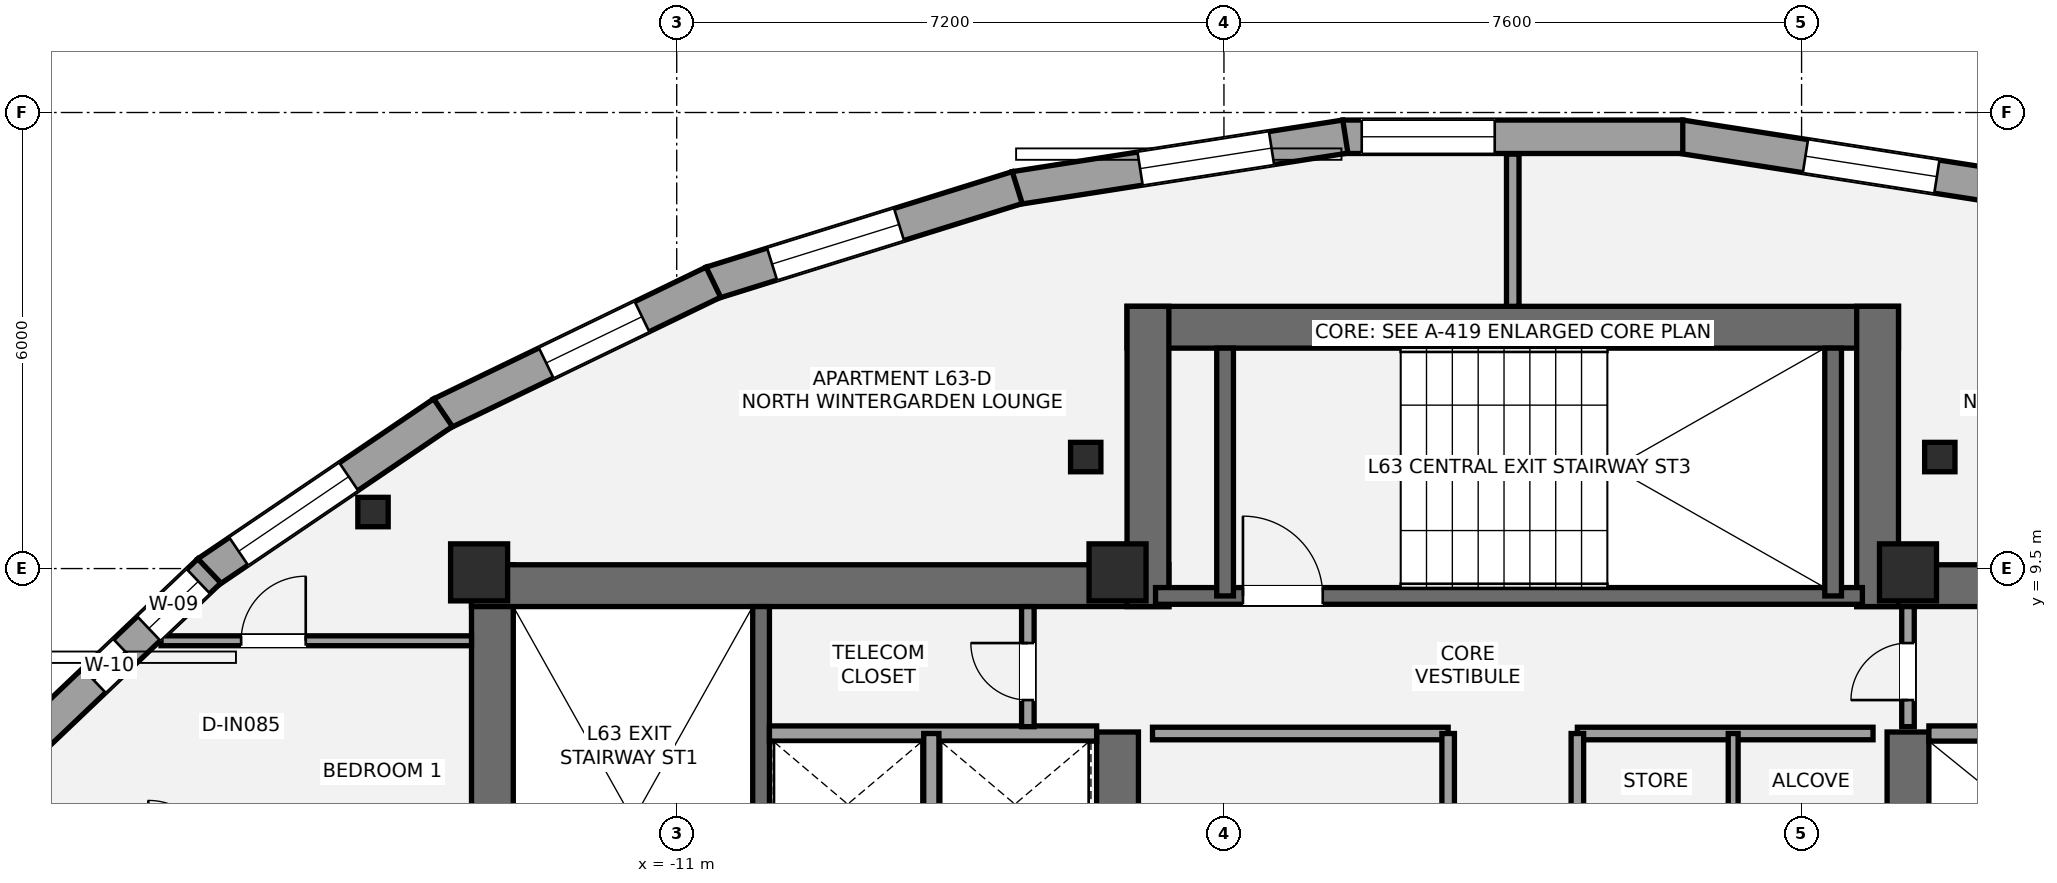
"""IFC4 building model, lengths in metres.
Left out: names, types, materials, properties, quantities, classifications, styles, units other than length and angle.
Written with IfcOpenShell. Run it as: python <this file> out.ifc"""

import sys

from ifc_helpers import new_model, si_unit, direction, frame, frame_2d, origin, origin_2d, place, context, subcontext, project, spatial, rectangle, i_section, extrude, element, fill, save


model = new_model("IFC4")
c1 = context("Model", 3, precision=1e-05, world=origin(), true_north=direction((0.0, 1.0)))
c2 = subcontext(c1, "Body", "Model", "MODEL_VIEW")
j1 = project(units=[si_unit("LENGTHUNIT", "METRE"), si_unit("PLANEANGLEUNIT", "RADIAN")], contexts=[c1])
p1 = place(None, origin())
s1 = spatial("IfcSite", under=j1, at=p1, CompositionType="ELEMENT")
p2 = place(p1, origin())
s2 = spatial("IfcBuilding", under=s1, at=p2, CompositionType="ELEMENT")
p3 = place(p2, frame((0.0, 0.0, 225.75)))
s3 = spatial("IfcBuildingStorey", under=s2, at=p3, CompositionType="ELEMENT", Elevation=225.75)
p4 = place(p3, frame((-13.425, 1.3, 0.0), z_axis=(0.0, 0.0, 1.0), x_axis=(0.0, 1.0, 0.0)))
e1 = element("IfcWall", 1, at=p4, inside=s3, PredefinedType="SHEAR", context=c2, shape_type="SweptSolid", body=[
    extrude(rectangle(XDim=8.25, YDim=0.55, at=frame_2d((4.125, 0.0))), origin(), (0.0, 0.0, 1.0), 3.15),
])
p5 = place(p3, frame((-13.7, 9.275, 0.0), z_axis=(0.0, 0.0, 1.0), x_axis=(1.0, 0.0, 0.0)))
e2 = element("IfcWall", 2, at=p5, inside=s3, PredefinedType="SHEAR", context=c2, shape_type="SweptSolid", body=[
    extrude(rectangle(XDim=9.175, YDim=0.55, at=frame_2d((4.587, 0.0))), origin(), (0.0, 0.0, 1.0), 3.15),
])
p6 = place(p3, frame((-5.2, 5.35, 0.0), z_axis=(0.0, 0.0, 1.0), x_axis=(0.0, 1.0, 0.0)))
e3 = element("IfcWall", 3, at=p6, inside=s3, PredefinedType="SHEAR", context=c2, shape_type="SweptSolid", body=[
    extrude(rectangle(XDim=2.0, YDim=0.55, at=frame_2d((1.0, 0.0))), origin(), (0.0, 0.0, 1.0), 3.15),
])
p7 = place(p3, frame((-9.89, 1.85, 0.0), z_axis=(0.0, 0.0, 1.0), x_axis=(0.0, 1.0, 0.0)))
e4 = element("IfcWall", 4, at=p7, inside=s3, PredefinedType="SHEAR", context=c2, shape_type="SweptSolid", body=[
    extrude(rectangle(XDim=7.15, YDim=0.22, at=frame_2d((3.575, 0.0))), origin(), (0.0, 0.0, 1.0), 3.15),
])
p8 = place(p3, frame((4.525, 9.275, 0.0), z_axis=(0.0, 0.0, 1.0), x_axis=(1.0, 0.0, 0.0)))
e5 = element("IfcWall", 5, at=p8, inside=s3, PredefinedType="SHEAR", context=c2, shape_type="SweptSolid", body=[
    extrude(rectangle(XDim=9.175, YDim=0.55, at=frame_2d((4.587, 0.0))), origin(), (0.0, 0.0, 1.0), 3.15),
])
p9 = place(p3, frame((5.2, 5.35, 0.0), z_axis=(0.0, 0.0, 1.0), x_axis=(0.0, 1.0, 0.0)))
e6 = element("IfcWall", 6, at=p9, inside=s3, PredefinedType="SHEAR", context=c2, shape_type="SweptSolid", body=[
    extrude(rectangle(XDim=2.0, YDim=0.55, at=frame_2d((1.0, 0.0))), origin(), (0.0, 0.0, 1.0), 3.15),
])
p10 = place(p3, frame((-5.075, 12.675, 0.0), z_axis=(0.0, 0.0, 1.0), x_axis=(1.0, 0.0, 0.0)))
e7 = element("IfcWall", 7, at=p10, inside=s3, PredefinedType="SHEAR", context=c2, shape_type="SweptSolid", body=[
    extrude(rectangle(XDim=10.15, YDim=0.55, at=frame_2d((5.075, 0.0))), origin(), (0.0, 0.0, 1.0), 3.15),
])
for number, where, z_axis, x_axis in (
    (8, (-4.8, 9.0, 0.0), (0.0, 0.0, 1.0), (0.0, 1.0, 0.0)),
    (9, (4.8, 9.0, 0.0), (0.0, 0.0, 1.0), (0.0, 1.0, 0.0)),
):
    element("IfcWall", number, at=place(p3, frame(where, z_axis=z_axis, x_axis=x_axis)), inside=s3, PredefinedType="SHEAR", context=c2, shape_type="SweptSolid", body=[
        extrude(rectangle(XDim=3.95, YDim=0.55, at=frame_2d((1.975, 0.0))), origin(), (0.0, 0.0, 1.0), 3.15),
    ])
p11 = place(p3, frame((-4.7, 9.14, 0.0), z_axis=(0.0, 0.0, 1.0), x_axis=(1.0, 0.0, 0.0)))
e10 = element("IfcWall", 10, at=p11, inside=s3, PredefinedType="SHEAR", context=c2, shape_type="SweptSolid", body=[
    extrude(rectangle(XDim=9.3, YDim=0.22, at=frame_2d((4.65, 0.0))), origin(), (0.0, 0.0, 1.0), 3.15),
])
p12 = place(p11, frame((1.15, 0.0, 0.0)))
e11 = element("IfcOpeningElement", 11, at=p12, cuts=e10, PredefinedType="OPENING", context=c2, shape_type="SweptSolid", body=[
    extrude(rectangle(XDim=1.05, YDim=2.15, at=frame_2d((0.525, 1.075))), frame((0.0, 0.12, 0.0), z_axis=(0.0, -1.0, 0.0), x_axis=(1.0, 0.0, 0.0)), (0.0, 0.0, 1.0), 0.24),
])
for number, where, z_axis, x_axis in (
    (12, (-3.785, 9.14, 0.0), (0.0, 0.0, 1.0), (0.0, 1.0, 0.0)),
    (13, (4.215, 9.14, 0.0), (0.0, 0.0, 1.0), (0.0, 1.0, 0.0)),
):
    element("IfcWall", number, at=place(p3, frame(where, z_axis=z_axis, x_axis=x_axis)), inside=s3, PredefinedType="SHEAR", context=c2, shape_type="SweptSolid", body=[
        extrude(rectangle(XDim=3.26, YDim=0.22, at=frame_2d((1.63, 0.0))), origin(), (0.0, 0.0, 1.0), 3.15),
    ])
for number, where, z_axis, x_axis in (
    (14, (-13.6, 9.45, 0.0), (0.0, 0.0, 1.0), (1.0, 0.0, 0.0)),
    (15, (-5.2, 9.45, 0.0), (0.0, 0.0, 1.0), (1.0, 0.0, 0.0)),
    (16, (5.2, 9.45, 0.0), (0.0, 0.0, 1.0), (1.0, 0.0, 0.0)),
):
    element("IfcColumn", number, at=place(p3, frame(where, z_axis=z_axis, x_axis=x_axis)), inside=s3, PredefinedType="PILASTER", context=c2, shape_type="SweptSolid", body=[
        extrude(rectangle(XDim=0.75, YDim=0.75, at=origin_2d()), origin(), (0.0, 0.0, 1.0), 3.15),
    ])
for number, where, z_axis, x_axis in (
    (17, (5.619, 10.967, 0.0), (0.0, 0.0, 1.0), (1.0, 0.0, 0.0)),
    (18, (-5.619, 10.967, 0.0), (0.0, 0.0, 1.0), (1.0, 0.0, 0.0)),
    (19, (-14.996, 10.244, 0.0), (0.0, 0.0, 1.0), (1.0, 0.0, 0.0)),
):
    element("IfcColumn", number, at=place(p3, frame(where, z_axis=z_axis, x_axis=x_axis)), inside=s3, PredefinedType="COLUMN", context=c2, shape_type="SweptSolid", body=[
        extrude(i_section(OverallWidth=0.399, OverallDepth=0.387, WebThickness=0.021, FlangeThickness=0.033, at=origin_2d()), origin(), (0.0, 0.0, 1.0), 3.15),
    ])
p13 = place(p3, frame((2.203, 15.183, 0.0), z_axis=(0.0, 0.0, 1.0), x_axis=(0.988037139715, -0.154216116355, 0.0)))
e20 = element("IfcWall", 20, at=p13, inside=s3, PredefinedType="STANDARD", context=c2, shape_type="SweptSolid", body=[
    extrude(rectangle(XDim=4.401, YDim=0.44, at=frame_2d((2.201, 0.0))), origin(), (0.0, 0.0, 1.0), 2.336),
])
p14 = place(p13, frame((1.668, 0.0, 0.55)))
e21 = element("IfcOpeningElement", 21, at=p14, cuts=e20, PredefinedType="OPENING", context=c2, shape_type="SweptSolid", body=[
    extrude(rectangle(XDim=1.75, YDim=1.55, at=frame_2d((0.875, 0.775))), frame((0.0, 0.23, 0.0), z_axis=(0.0, -1.0, 0.0), x_axis=(1.0, 0.0, 0.0)), (0.0, 0.0, 1.0), 0.46),
])
p15 = place(p3, frame((-2.237, 15.181, 0.0), z_axis=(0.0, 0.0, 1.0), x_axis=(1.0, 0.0, 0.0)))
e22 = element("IfcWall", 22, at=p15, inside=s3, PredefinedType="STANDARD", context=c2, shape_type="SweptSolid", body=[
    extrude(rectangle(XDim=4.474, YDim=0.44, at=frame_2d((2.237, 0.0))), origin(), (0.0, 0.0, 1.0), 2.336),
])
p16 = place(p15, frame((0.25, 0.0, 0.55)))
e23 = element("IfcOpeningElement", 23, at=p16, cuts=e22, PredefinedType="OPENING", context=c2, shape_type="SweptSolid", body=[
    extrude(rectangle(XDim=1.75, YDim=1.55, at=frame_2d((0.875, 0.775))), frame((0.0, 0.23, 0.0), z_axis=(0.0, -1.0, 0.0), x_axis=(1.0, 0.0, 0.0)), (0.0, 0.0, 1.0), 0.46),
])
p17 = place(p3, frame((-6.551, 14.505, 0.0), z_axis=(0.0, 0.0, 1.0), x_axis=(0.988037139715, 0.154216116355, 0.0)))
e24 = element("IfcWall", 24, at=p17, inside=s3, PredefinedType="STANDARD", context=c2, shape_type="SweptSolid", body=[
    extrude(rectangle(XDim=4.401, YDim=0.44, at=frame_2d((2.201, 0.0))), origin(), (0.0, 0.0, 1.0), 2.336),
])
p18 = place(p17, frame((1.668, 0.0, 0.55)))
e25 = element("IfcOpeningElement", 25, at=p18, cuts=e24, PredefinedType="OPENING", context=c2, shape_type="SweptSolid", body=[
    extrude(rectangle(XDim=1.75, YDim=1.55, at=frame_2d((0.875, 0.775))), frame((0.0, 0.23, 0.0), z_axis=(0.0, -1.0, 0.0), x_axis=(1.0, 0.0, 0.0)), (0.0, 0.0, 1.0), 0.46),
])
p19 = place(p3, frame((-10.548, 13.256, 0.0), z_axis=(0.0, 0.0, 1.0), x_axis=(0.954643532685, 0.297751113352, 0.0)))
e26 = element("IfcWall", 26, at=p19, inside=s3, PredefinedType="STANDARD", context=c2, shape_type="SweptSolid", body=[
    extrude(rectangle(XDim=4.219, YDim=0.44, at=frame_2d((2.11, 0.0))), origin(), (0.0, 0.0, 1.0), 2.336),
])
p20 = place(p19, frame((0.841, 0.0, 0.55)))
e27 = element("IfcOpeningElement", 27, at=p20, cuts=e26, PredefinedType="OPENING", context=c2, shape_type="SweptSolid", body=[
    extrude(rectangle(XDim=1.75, YDim=1.55, at=frame_2d((0.875, 0.775))), frame((0.0, 0.23, 0.0), z_axis=(0.0, -1.0, 0.0), x_axis=(1.0, 0.0, 0.0)), (0.0, 0.0, 1.0), 0.46),
])
p21 = place(p3, frame((-14.103, 11.535, 0.0), z_axis=(0.0, 0.0, 1.0), x_axis=(0.900331335269, 0.435205108808, 0.0)))
e28 = element("IfcWall", 28, at=p21, inside=s3, PredefinedType="STANDARD", context=c2, shape_type="SweptSolid", body=[
    extrude(rectangle(XDim=3.982, YDim=0.44, at=frame_2d((1.991, 0.0))), origin(), (0.0, 0.0, 1.0), 2.336),
])
p22 = place(p21, frame((1.539, 0.0, 0.55)))
e29 = element("IfcOpeningElement", 29, at=p22, cuts=e28, PredefinedType="OPENING", context=c2, shape_type="SweptSolid", body=[
    extrude(rectangle(XDim=1.4, YDim=1.55, at=frame_2d((0.7, 0.775))), frame((0.0, 0.23, 0.0), z_axis=(0.0, -1.0, 0.0), x_axis=(1.0, 0.0, 0.0)), (0.0, 0.0, 1.0), 0.46),
])
p23 = place(p3, frame((-17.177, 9.447, 0.0), z_axis=(0.0, 0.0, 1.0), x_axis=(0.827635686249, 0.561265686504, 0.0)))
e30 = element("IfcWall", 30, at=p23, inside=s3, PredefinedType="STANDARD", context=c2, shape_type="SweptSolid", body=[
    extrude(rectangle(XDim=3.749, YDim=0.44, at=frame_2d((1.875, 0.0))), origin(), (0.0, 0.0, 1.0), 2.336),
])
p24 = place(p23, frame((0.5, 0.0, 0.55)))
e31 = element("IfcOpeningElement", 31, at=p24, cuts=e30, PredefinedType="OPENING", context=c2, shape_type="SweptSolid", body=[
    extrude(rectangle(XDim=1.75, YDim=1.55, at=frame_2d((0.875, 0.775))), frame((0.0, 0.23, 0.0), z_axis=(0.0, -1.0, 0.0), x_axis=(1.0, 0.0, 0.0)), (0.0, 0.0, 1.0), 0.46),
])
p25 = place(p3, frame((-19.705, 7.038, 0.0), z_axis=(0.0, 0.0, 1.0), x_axis=(0.724503260132, 0.689271373306, 0.0)))
e32 = element("IfcWall", 32, at=p25, inside=s3, PredefinedType="STANDARD", context=c2, shape_type="SweptSolid", body=[
    extrude(rectangle(XDim=3.527, YDim=0.44, at=frame_2d((1.764, 0.0))), origin(), (0.0, 0.0, 1.0), 2.336),
])
p26 = place(p25, frame((2.427, 0.0, 0.58)))
e33 = element("IfcOpeningElement", 33, at=p26, cuts=e32, PredefinedType="OPENING", context=c2, shape_type="SweptSolid", body=[
    extrude(rectangle(XDim=0.9, YDim=1.35, at=frame_2d((0.45, 0.675))), frame((0.0, 0.23, 0.0), z_axis=(0.0, -1.0, 0.0), x_axis=(1.0, 0.0, 0.0)), (0.0, 0.0, 1.0), 0.46),
])
p27 = place(p25, frame((1.434, 0.0, 0.58)))
e34 = element("IfcOpeningElement", 34, at=p27, cuts=e32, PredefinedType="OPENING", context=c2, shape_type="SweptSolid", body=[
    extrude(rectangle(XDim=0.56, YDim=1.15, at=frame_2d((0.28, 0.575))), frame((0.0, 0.23, 0.0), z_axis=(0.0, -1.0, 0.0), x_axis=(1.0, 0.0, 0.0)), (0.0, 0.0, 1.0), 0.46),
])
p28 = place(p3, frame((-9.78, 7.33, 0.0), z_axis=(0.0, 0.0, 1.0), x_axis=(1.0, 0.0, 0.0)))
e35 = element("IfcWall", 35, at=p28, inside=s3, PredefinedType="SOLIDWALL", context=c2, shape_type="SweptSolid", body=[
    extrude(rectangle(XDim=4.305, YDim=0.2, at=frame_2d((2.152, 0.0))), origin(), (0.0, 0.0, 1.0), 2.97),
])
p29 = place(p3, frame((-7.65, 5.47, 0.0), z_axis=(0.0, 0.0, 1.0), x_axis=(0.0, 1.0, 0.0)))
e36 = element("IfcWall", 36, at=p29, inside=s3, PredefinedType="SOLIDWALL", context=c2, shape_type="SweptSolid", body=[
    extrude(rectangle(XDim=1.86, YDim=0.2, at=frame_2d((0.93, 0.0))), origin(), (0.0, 0.0, 1.0), 2.97),
])
p30 = place(p3, frame((5.475, 7.33, 0.0), z_axis=(0.0, 0.0, 1.0), x_axis=(1.0, 0.0, 0.0)))
e37 = element("IfcWall", 37, at=p30, inside=s3, PredefinedType="SOLIDWALL", context=c2, shape_type="SweptSolid", body=[
    extrude(rectangle(XDim=4.305, YDim=0.2, at=frame_2d((2.152, 0.0))), origin(), (0.0, 0.0, 1.0), 2.97),
])
p31 = place(p3, frame((-4.74, 7.33, 0.0), z_axis=(0.0, 0.0, 1.0), x_axis=(1.0, 0.0, 0.0)))
e38 = element("IfcWall", 38, at=p31, inside=s3, PredefinedType="PARTITIONING", context=c2, shape_type="SweptSolid", body=[
    extrude(rectangle(XDim=3.89, YDim=0.165, at=frame_2d((1.945, 0.0))), origin(), (0.0, 0.0, 1.0), 2.97),
])
p32 = place(p3, frame((-0.85, 5.52, 0.0), z_axis=(0.0, 0.0, 1.0), x_axis=(0.0, 1.0, 0.0)))
e39 = element("IfcWall", 39, at=p32, inside=s3, PredefinedType="PARTITIONING", context=c2, shape_type="SweptSolid", body=[
    extrude(rectangle(XDim=1.81, YDim=0.165, at=frame_2d((0.905, 0.0))), origin(), (0.0, 0.0, 1.0), 2.97),
])
p33 = place(p3, frame((0.85, 7.33, 0.0), z_axis=(0.0, 0.0, 1.0), x_axis=(1.0, 0.0, 0.0)))
e40 = element("IfcWall", 40, at=p33, inside=s3, PredefinedType="PARTITIONING", context=c2, shape_type="SweptSolid", body=[
    extrude(rectangle(XDim=3.89, YDim=0.165, at=frame_2d((1.945, 0.0))), origin(), (0.0, 0.0, 1.0), 2.97),
])
p34 = place(p3, frame((0.85, 5.52, 0.0), z_axis=(0.0, 0.0, 1.0), x_axis=(0.0, 1.0, 0.0)))
e41 = element("IfcWall", 41, at=p34, inside=s3, PredefinedType="PARTITIONING", context=c2, shape_type="SweptSolid", body=[
    extrude(rectangle(XDim=1.81, YDim=0.165, at=frame_2d((0.905, 0.0))), origin(), (0.0, 0.0, 1.0), 2.97),
])
p35 = place(p3, frame((2.9, 5.52, 0.0), z_axis=(0.0, 0.0, 1.0), x_axis=(0.0, 1.0, 0.0)))
e42 = element("IfcWall", 42, at=p35, inside=s3, PredefinedType="PARTITIONING", context=c2, shape_type="SweptSolid", body=[
    extrude(rectangle(XDim=1.81, YDim=0.13, at=frame_2d((0.905, 0.0))), origin(), (0.0, 0.0, 1.0), 2.97),
])
p36 = place(p3, frame((-6.38, 7.42, 0.0), z_axis=(0.0, 0.0, 1.0), x_axis=(0.0, 1.0, 0.0)))
e43 = element("IfcWall", 43, at=p36, inside=s3, PredefinedType="PARTITIONING", context=c2, shape_type="SweptSolid", body=[
    extrude(rectangle(XDim=1.58, YDim=0.165, at=frame_2d((0.79, 0.0))), origin(), (0.0, 0.0, 1.0), 2.97),
])
p37 = place(p36, frame((0.35, 0.0, 0.0)))
e44 = element("IfcOpeningElement", 44, at=p37, cuts=e43, PredefinedType="OPENING", context=c2, shape_type="SweptSolid", body=[
    extrude(rectangle(XDim=0.75, YDim=2.1, at=frame_2d((0.375, 1.05))), frame((0.0, 0.093, 0.0), z_axis=(0.0, -1.0, 0.0), x_axis=(1.0, 0.0, 0.0)), (0.0, 0.0, 1.0), 0.185),
])
p38 = place(p3, frame((5.2, 7.42, 0.0), z_axis=(0.0, 0.0, 1.0), x_axis=(0.0, 1.0, 0.0)))
e45 = element("IfcWall", 45, at=p38, inside=s3, PredefinedType="PARTITIONING", context=c2, shape_type="SweptSolid", body=[
    extrude(rectangle(XDim=1.58, YDim=0.165, at=frame_2d((0.79, 0.0))), origin(), (0.0, 0.0, 1.0), 2.97),
])
p39 = place(p38, frame((0.35, 0.0, 0.0)))
e46 = element("IfcOpeningElement", 46, at=p39, cuts=e45, PredefinedType="OPENING", context=c2, shape_type="SweptSolid", body=[
    extrude(rectangle(XDim=0.75, YDim=2.1, at=frame_2d((0.375, 1.05))), frame((0.0, 0.093, 0.0), z_axis=(0.0, -1.0, 0.0), x_axis=(1.0, 0.0, 0.0)), (0.0, 0.0, 1.0), 0.185),
])
p40 = place(p3, frame((0.0, 12.95, 0.0), z_axis=(0.0, 0.0, 1.0), x_axis=(0.0, 1.0, 0.0)))
e47 = element("IfcWall", 47, at=p40, inside=s3, PredefinedType="PARTITIONING", context=c2, shape_type="SweptSolid", body=[
    extrude(rectangle(XDim=2.003, YDim=0.165, at=frame_2d((1.001, 0.0))), origin(), (0.0, 0.0, 1.0), 2.97),
])
p41 = place(p3, frame((-17.785, 8.55, 0.0), z_axis=(0.0, 0.0, 1.0), x_axis=(1.0, 0.0, 0.0)))
e48 = element("IfcWall", 48, at=p41, inside=s3, PredefinedType="PARTITIONING", context=c2, shape_type="SweptSolid", body=[
    extrude(rectangle(XDim=4.085, YDim=0.13, at=frame_2d((2.042, 0.0))), origin(), (0.0, 0.0, 1.0), 2.423),
])
p42 = place(p41, frame((1.054, 0.0, 0.0)))
e49 = element("IfcOpeningElement", 49, at=p42, cuts=e48, PredefinedType="OPENING", context=c2, shape_type="SweptSolid", body=[
    extrude(rectangle(XDim=0.85, YDim=2.1, at=frame_2d((0.425, 1.05))), frame((0.0, 0.075, 0.0), z_axis=(0.0, -1.0, 0.0), x_axis=(1.0, 0.0, 0.0)), (0.0, 0.0, 1.0), 0.15),
])
p43 = place(p14, origin())
e50 = element("IfcWindow", 50, at=p43, inside=s3, PartitioningType="SINGLE_PANEL", PredefinedType="WINDOW", context=c2, shape_type="SweptSolid", body=[
    extrude(rectangle(XDim=1.75, YDim=1.55, at=frame_2d((0.875, 0.775))), frame((0.0, -0.01, 0.0), z_axis=(0.0, -1.0, 0.0), x_axis=(1.0, 0.0, 0.0)), (0.0, 0.0, 1.0), 0.06),
])
fill(e21, e50)
p44 = place(p16, origin())
e51 = element("IfcWindow", 51, at=p44, inside=s3, PartitioningType="SINGLE_PANEL", PredefinedType="WINDOW", context=c2, shape_type="SweptSolid", body=[
    extrude(rectangle(XDim=1.75, YDim=1.55, at=frame_2d((0.875, 0.775))), frame((0.0, -0.01, 0.0), z_axis=(0.0, -1.0, 0.0), x_axis=(1.0, 0.0, 0.0)), (0.0, 0.0, 1.0), 0.06),
])
fill(e23, e51)
p45 = place(p18, origin())
e52 = element("IfcWindow", 52, at=p45, inside=s3, PartitioningType="SINGLE_PANEL", PredefinedType="WINDOW", context=c2, shape_type="SweptSolid", body=[
    extrude(rectangle(XDim=1.75, YDim=1.55, at=frame_2d((0.875, 0.775))), frame((0.0, -0.01, 0.0), z_axis=(0.0, -1.0, 0.0), x_axis=(1.0, 0.0, 0.0)), (0.0, 0.0, 1.0), 0.06),
])
fill(e25, e52)
p46 = place(p20, origin())
e53 = element("IfcWindow", 53, at=p46, inside=s3, PartitioningType="SINGLE_PANEL", PredefinedType="WINDOW", context=c2, shape_type="SweptSolid", body=[
    extrude(rectangle(XDim=1.75, YDim=1.55, at=frame_2d((0.875, 0.775))), frame((0.0, -0.01, 0.0), z_axis=(0.0, -1.0, 0.0), x_axis=(1.0, 0.0, 0.0)), (0.0, 0.0, 1.0), 0.06),
])
fill(e27, e53)
p47 = place(p22, origin())
e54 = element("IfcWindow", 54, at=p47, inside=s3, PartitioningType="SINGLE_PANEL", PredefinedType="WINDOW", context=c2, shape_type="SweptSolid", body=[
    extrude(rectangle(XDim=1.4, YDim=1.55, at=frame_2d((0.7, 0.775))), frame((0.0, -0.01, 0.0), z_axis=(0.0, -1.0, 0.0), x_axis=(1.0, 0.0, 0.0)), (0.0, 0.0, 1.0), 0.06),
])
fill(e29, e54)
p48 = place(p24, origin())
e55 = element("IfcWindow", 55, at=p48, inside=s3, PartitioningType="SINGLE_PANEL", PredefinedType="WINDOW", context=c2, shape_type="SweptSolid", body=[
    extrude(rectangle(XDim=1.75, YDim=1.55, at=frame_2d((0.875, 0.775))), frame((0.0, -0.01, 0.0), z_axis=(0.0, -1.0, 0.0), x_axis=(1.0, 0.0, 0.0)), (0.0, 0.0, 1.0), 0.06),
])
fill(e31, e55)
p49 = place(p26, origin())
e56 = element("IfcWindow", 56, at=p49, inside=s3, PartitioningType="SINGLE_PANEL", PredefinedType="WINDOW", context=c2, shape_type="SweptSolid", body=[
    extrude(rectangle(XDim=0.9, YDim=1.35, at=frame_2d((0.45, 0.675))), frame((0.0, -0.01, 0.0), z_axis=(0.0, -1.0, 0.0), x_axis=(1.0, 0.0, 0.0)), (0.0, 0.0, 1.0), 0.06),
])
fill(e33, e56)
p50 = place(p27, origin())
e57 = element("IfcWindow", 57, at=p50, inside=s3, PartitioningType="SINGLE_PANEL", PredefinedType="WINDOW", context=c2, shape_type="SweptSolid", body=[
    extrude(rectangle(XDim=0.56, YDim=1.15, at=frame_2d((0.28, 0.575))), frame((0.0, -0.01, 0.0), z_axis=(0.0, -1.0, 0.0), x_axis=(1.0, 0.0, 0.0)), (0.0, 0.0, 1.0), 0.06),
])
fill(e34, e57)
p51 = place(p12, origin())
e58 = element("IfcDoor", 58, at=p51, inside=s3, OperationType="SINGLE_SWING_LEFT", PredefinedType="DOOR", context=c2, shape_type="SweptSolid", body=[
    extrude(rectangle(XDim=1.05, YDim=2.15, at=frame_2d((0.525, 1.075))), frame((0.0, 0.025, 0.0), z_axis=(0.0, -1.0, 0.0), x_axis=(1.0, 0.0, 0.0)), (0.0, 0.0, 1.0), 0.05),
])
fill(e11, e58)
p52 = place(p37, origin())
e59 = element("IfcDoor", 59, at=p52, inside=s3, OperationType="SINGLE_SWING_RIGHT", PredefinedType="DOOR", context=c2, shape_type="SweptSolid", body=[
    extrude(rectangle(XDim=0.75, YDim=2.1, at=frame_2d((0.375, 1.05))), frame((0.0, 0.025, 0.0), z_axis=(0.0, -1.0, 0.0), x_axis=(1.0, 0.0, 0.0)), (0.0, 0.0, 1.0), 0.05),
])
fill(e44, e59)
p53 = place(p39, origin())
e60 = element("IfcDoor", 60, at=p53, inside=s3, OperationType="SINGLE_SWING_LEFT", PredefinedType="DOOR", context=c2, shape_type="SweptSolid", body=[
    extrude(rectangle(XDim=0.75, YDim=2.1, at=frame_2d((0.375, 1.05))), frame((0.0, 0.025, 0.0), z_axis=(0.0, -1.0, 0.0), x_axis=(1.0, 0.0, 0.0)), (0.0, 0.0, 1.0), 0.05),
])
fill(e46, e60)
p54 = place(p42, origin())
e61 = element("IfcDoor", 61, at=p54, inside=s3, OperationType="SINGLE_SWING_RIGHT", PredefinedType="DOOR", context=c2, shape_type="SweptSolid", body=[
    extrude(rectangle(XDim=0.85, YDim=2.1, at=frame_2d((0.425, 1.05))), frame((0.0, 0.025, 0.0), z_axis=(0.0, -1.0, 0.0), x_axis=(1.0, 0.0, 0.0)), (0.0, 0.0, 1.0), 0.05),
])
fill(e49, e61)
save(model, sys.argv[1])
